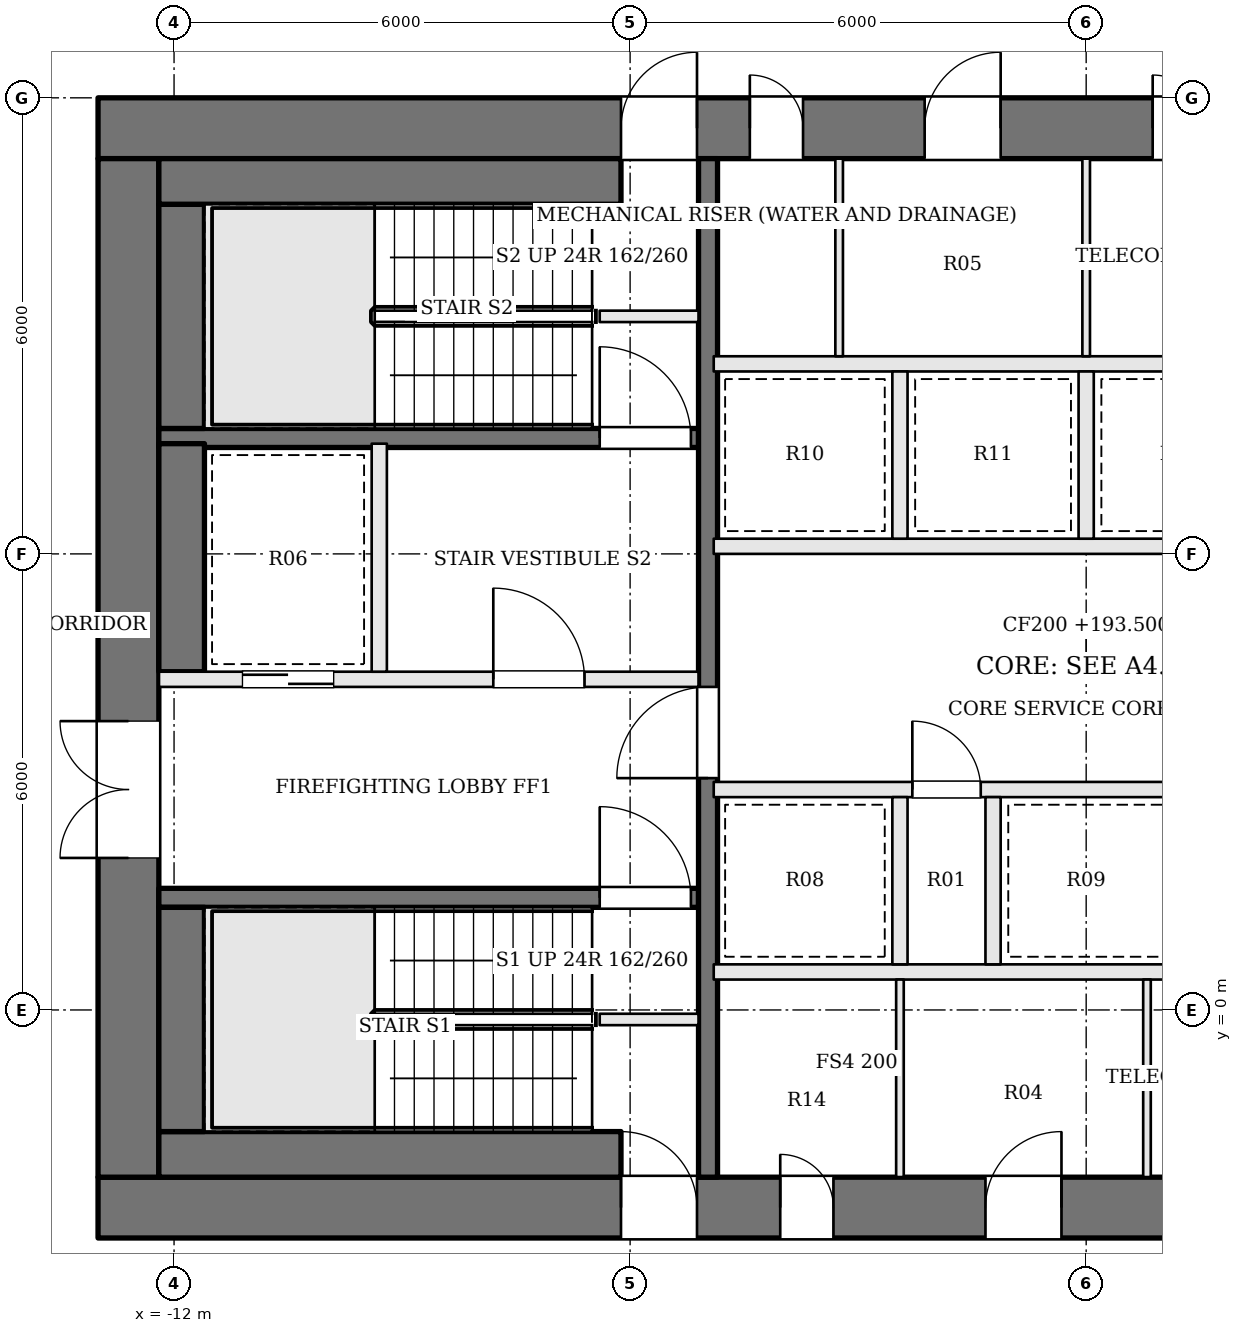
"""IFC4 building model, lengths in metres.
Left out: names, types, materials, properties, quantities, classifications, styles, units other than length and angle.
Written with IfcOpenShell. Run it as: python <this file> out.ifc"""

import sys

from ifc_helpers import new_model, si_unit, direction, frame, frame_2d, origin, place, context, subcontext, project, spatial, rectangle, extrude, element, fill, save


model = new_model("IFC4")
c1 = context("Model", 3, precision=1e-05, world=origin(), true_north=direction((0.0, 1.0)))
c2 = subcontext(c1, "Body", "Model", "MODEL_VIEW")
j1 = project(units=[si_unit("LENGTHUNIT", "METRE"), si_unit("PLANEANGLEUNIT", "RADIAN")], contexts=[c1])
p1 = place(None, origin())
s1 = spatial("IfcSite", under=j1, at=p1, CompositionType="ELEMENT")
p2 = place(p1, origin())
s2 = spatial("IfcBuilding", under=s1, at=p2, CompositionType="ELEMENT")
p3 = place(p2, frame((0.0, 0.0, 193.5)))
s3 = spatial("IfcBuildingStorey", under=s2, at=p3, CompositionType="ELEMENT", Elevation=193.5)
p4 = place(p3, frame((-13.0, 11.6, 0.0), z_axis=(0.0, 0.0, 1.0), x_axis=(1.0, 0.0, 0.0)))
e1 = element("IfcWall", 1, at=p4, inside=s3, PredefinedType="SHEAR", context=c2, shape_type="SweptSolid", body=[
    extrude(rectangle(XDim=26.0, YDim=0.8, at=frame_2d((13.0, 0.0))), origin(), (0.0, 0.0, 1.0), 3.9),
])
p5 = place(p4, frame((8.575, 0.0, 0.0)))
e2 = element("IfcOpeningElement", 2, at=p5, cuts=e1, PredefinedType="OPENING", context=c2, shape_type="SweptSolid", body=[
    extrude(rectangle(XDim=0.7, YDim=2.1, at=frame_2d((0.35, 1.05))), frame((0.0, 0.41, 0.0), z_axis=(0.0, -1.0, 0.0), x_axis=(1.0, 0.0, 0.0)), (0.0, 0.0, 1.0), 0.82),
])
p6 = place(p4, frame((10.875, 0.0, 0.0)))
e3 = element("IfcOpeningElement", 3, at=p6, cuts=e1, PredefinedType="OPENING", context=c2, shape_type="SweptSolid", body=[
    extrude(rectangle(XDim=1.0, YDim=2.1, at=frame_2d((0.5, 1.05))), frame((0.0, 0.41, 0.0), z_axis=(0.0, -1.0, 0.0), x_axis=(1.0, 0.0, 0.0)), (0.0, 0.0, 1.0), 0.82),
])
p7 = place(p4, frame((13.875, 0.0, 0.0)))
e4 = element("IfcOpeningElement", 4, at=p7, cuts=e1, PredefinedType="OPENING", context=c2, shape_type="SweptSolid", body=[
    extrude(rectangle(XDim=0.7, YDim=2.1, at=frame_2d((0.35, 1.05))), frame((0.0, 0.41, 0.0), z_axis=(0.0, -1.0, 0.0), x_axis=(1.0, 0.0, 0.0)), (0.0, 0.0, 1.0), 0.82),
])
p8 = place(p4, frame((16.325, 0.0, 0.0)))
e5 = element("IfcOpeningElement", 5, at=p8, cuts=e1, PredefinedType="OPENING", context=c2, shape_type="SweptSolid", body=[
    extrude(rectangle(XDim=0.7, YDim=2.1, at=frame_2d((0.35, 1.05))), frame((0.0, 0.41, 0.0), z_axis=(0.0, -1.0, 0.0), x_axis=(1.0, 0.0, 0.0)), (0.0, 0.0, 1.0), 0.82),
])
p9 = place(p4, frame((6.88, 0.0, 0.0)))
e6 = element("IfcOpeningElement", 6, at=p9, cuts=e1, PredefinedType="OPENING", context=c2, shape_type="SweptSolid", body=[
    extrude(rectangle(XDim=1.0, YDim=2.1, at=frame_2d((0.5, 1.05))), frame((0.0, 0.41, 0.0), z_axis=(0.0, -1.0, 0.0), x_axis=(1.0, 0.0, 0.0)), (0.0, 0.0, 1.0), 0.82),
])
p10 = place(p4, frame((18.12, 0.0, 0.0)))
e7 = element("IfcOpeningElement", 7, at=p10, cuts=e1, PredefinedType="OPENING", context=c2, shape_type="SweptSolid", body=[
    extrude(rectangle(XDim=1.0, YDim=2.1, at=frame_2d((0.5, 1.05))), frame((0.0, 0.41, 0.0), z_axis=(0.0, -1.0, 0.0), x_axis=(1.0, 0.0, 0.0)), (0.0, 0.0, 1.0), 0.82),
])
p11 = place(p3, frame((-13.0, -2.6, 0.0), z_axis=(0.0, 0.0, 1.0), x_axis=(1.0, 0.0, 0.0)))
e8 = element("IfcWall", 8, at=p11, inside=s3, PredefinedType="SHEAR", context=c2, shape_type="SweptSolid", body=[
    extrude(rectangle(XDim=26.0, YDim=0.8, at=frame_2d((13.0, 0.0))), origin(), (0.0, 0.0, 1.0), 3.9),
])
p12 = place(p11, frame((8.975, 0.0, 0.0)))
e9 = element("IfcOpeningElement", 9, at=p12, cuts=e8, PredefinedType="OPENING", context=c2, shape_type="SweptSolid", body=[
    extrude(rectangle(XDim=0.7, YDim=2.1, at=frame_2d((0.35, 1.05))), frame((0.0, 0.41, 0.0), z_axis=(0.0, -1.0, 0.0), x_axis=(1.0, 0.0, 0.0)), (0.0, 0.0, 1.0), 0.82),
])
p13 = place(p11, frame((11.675, 0.0, 0.0)))
e10 = element("IfcOpeningElement", 10, at=p13, cuts=e8, PredefinedType="OPENING", context=c2, shape_type="SweptSolid", body=[
    extrude(rectangle(XDim=1.0, YDim=2.1, at=frame_2d((0.5, 1.05))), frame((0.0, 0.41, 0.0), z_axis=(0.0, -1.0, 0.0), x_axis=(1.0, 0.0, 0.0)), (0.0, 0.0, 1.0), 0.82),
])
p14 = place(p11, frame((14.275, 0.0, 0.0)))
e11 = element("IfcOpeningElement", 11, at=p14, cuts=e8, PredefinedType="OPENING", context=c2, shape_type="SweptSolid", body=[
    extrude(rectangle(XDim=0.7, YDim=2.1, at=frame_2d((0.35, 1.05))), frame((0.0, 0.41, 0.0), z_axis=(0.0, -1.0, 0.0), x_axis=(1.0, 0.0, 0.0)), (0.0, 0.0, 1.0), 0.82),
])
p15 = place(p11, frame((16.225, 0.0, 0.0)))
e12 = element("IfcOpeningElement", 12, at=p15, cuts=e8, PredefinedType="OPENING", context=c2, shape_type="SweptSolid", body=[
    extrude(rectangle(XDim=0.9, YDim=2.1, at=frame_2d((0.45, 1.05))), frame((0.0, 0.41, 0.0), z_axis=(0.0, -1.0, 0.0), x_axis=(1.0, 0.0, 0.0)), (0.0, 0.0, 1.0), 0.82),
])
p16 = place(p11, frame((6.88, 0.0, 0.0)))
e13 = element("IfcOpeningElement", 13, at=p16, cuts=e8, PredefinedType="OPENING", context=c2, shape_type="SweptSolid", body=[
    extrude(rectangle(XDim=1.0, YDim=2.1, at=frame_2d((0.5, 1.05))), frame((0.0, 0.41, 0.0), z_axis=(0.0, -1.0, 0.0), x_axis=(1.0, 0.0, 0.0)), (0.0, 0.0, 1.0), 0.82),
])
p17 = place(p11, frame((18.12, 0.0, 0.0)))
e14 = element("IfcOpeningElement", 14, at=p17, cuts=e8, PredefinedType="OPENING", context=c2, shape_type="SweptSolid", body=[
    extrude(rectangle(XDim=1.0, YDim=2.1, at=frame_2d((0.5, 1.05))), frame((0.0, 0.41, 0.0), z_axis=(0.0, -1.0, 0.0), x_axis=(1.0, 0.0, 0.0)), (0.0, 0.0, 1.0), 0.82),
])
p18 = place(p3, frame((-12.6, -2.2, 0.0), z_axis=(0.0, 0.0, 1.0), x_axis=(0.0, 1.0, 0.0)))
e15 = element("IfcWall", 15, at=p18, inside=s3, PredefinedType="SHEAR", context=c2, shape_type="SweptSolid", body=[
    extrude(rectangle(XDim=13.4, YDim=0.8, at=frame_2d((6.7, 0.0))), origin(), (0.0, 0.0, 1.0), 3.9),
])
p19 = place(p18, frame((4.2, 0.0, 0.0)))
e16 = element("IfcOpeningElement", 16, at=p19, cuts=e15, PredefinedType="OPENING", context=c2, shape_type="SweptSolid", body=[
    extrude(rectangle(XDim=1.8, YDim=2.1, at=frame_2d((0.9, 1.05))), frame((0.0, 0.41, 0.0), z_axis=(0.0, -1.0, 0.0), x_axis=(1.0, 0.0, 0.0)), (0.0, 0.0, 1.0), 0.82),
])
for number, where, z_axis, x_axis in (
    (17, (-6.4, -0.125, 0.0), (0.0, 0.0, 1.0), (1.0, 0.0, 0.0)),
    (18, (-6.4, 9.125, 0.0), (0.0, 0.0, 1.0), (1.0, 0.0, 0.0)),
):
    element("IfcWall", number, at=place(p3, frame(where, z_axis=z_axis, x_axis=x_axis)), inside=s3, PredefinedType="SOLIDWALL", context=c2, shape_type="SweptSolid", body=[
        extrude(rectangle(XDim=1.3, YDim=0.15, at=frame_2d((0.65, 0.0))), origin(), (0.0, 0.0, 1.0), 3.7),
    ])
p20 = place(p3, frame((-12.2, 1.475, 0.0), z_axis=(0.0, 0.0, 1.0), x_axis=(1.0, 0.0, 0.0)))
e19 = element("IfcWall", 19, at=p20, inside=s3, PredefinedType="SOLIDWALL", context=c2, shape_type="SweptSolid", body=[
    extrude(rectangle(XDim=7.1, YDim=0.25, at=frame_2d((3.55, 0.0))), origin(), (0.0, 0.0, 1.0), 3.7),
])
p21 = place(p20, frame((5.8, 0.0, 0.0)))
e20 = element("IfcOpeningElement", 20, at=p21, cuts=e19, PredefinedType="OPENING", context=c2, shape_type="SweptSolid", body=[
    extrude(rectangle(XDim=1.2, YDim=2.1, at=frame_2d((0.6, 1.05))), frame((0.0, 0.135, 0.0), z_axis=(0.0, -1.0, 0.0), x_axis=(1.0, 0.0, 0.0)), (0.0, 0.0, 1.0), 0.27),
])
p22 = place(p3, frame((-12.2, 4.35, 0.0), z_axis=(0.0, 0.0, 1.0), x_axis=(1.0, 0.0, 0.0)))
e21 = element("IfcWall", 21, at=p22, inside=s3, PredefinedType="SOLIDWALL", context=c2, shape_type="SweptSolid", body=[
    extrude(rectangle(XDim=7.1, YDim=0.2, at=frame_2d((3.55, 0.0))), origin(), (0.0, 0.0, 1.0), 3.7),
])
p23 = place(p22, frame((4.4, 0.0, 0.0)))
e22 = element("IfcOpeningElement", 22, at=p23, cuts=e21, PredefinedType="OPENING", context=c2, shape_type="SweptSolid", body=[
    extrude(rectangle(XDim=1.2, YDim=2.1, at=frame_2d((0.6, 1.05))), frame((0.0, 0.11, 0.0), z_axis=(0.0, -1.0, 0.0), x_axis=(1.0, 0.0, 0.0)), (0.0, 0.0, 1.0), 0.22),
])
p24 = place(p22, frame((1.1, 0.0, 0.0)))
e23 = element("IfcOpeningElement", 23, at=p24, cuts=e21, PredefinedType="OPENING", context=c2, shape_type="SweptSolid", body=[
    extrude(rectangle(XDim=1.2, YDim=2.1, at=frame_2d((0.6, 1.05))), frame((0.0, 0.11, 0.0), z_axis=(0.0, -1.0, 0.0), x_axis=(1.0, 0.0, 0.0)), (0.0, 0.0, 1.0), 0.22),
])
p25 = place(p3, frame((-12.2, 7.525, 0.0), z_axis=(0.0, 0.0, 1.0), x_axis=(1.0, 0.0, 0.0)))
e24 = element("IfcWall", 24, at=p25, inside=s3, PredefinedType="SOLIDWALL", context=c2, shape_type="SweptSolid", body=[
    extrude(rectangle(XDim=7.1, YDim=0.25, at=frame_2d((3.55, 0.0))), origin(), (0.0, 0.0, 1.0), 3.7),
])
p26 = place(p25, frame((5.8, 0.0, 0.0)))
e25 = element("IfcOpeningElement", 25, at=p26, cuts=e24, PredefinedType="OPENING", context=c2, shape_type="SweptSolid", body=[
    extrude(rectangle(XDim=1.2, YDim=2.1, at=frame_2d((0.6, 1.05))), frame((0.0, 0.135, 0.0), z_axis=(0.0, -1.0, 0.0), x_axis=(1.0, 0.0, 0.0)), (0.0, 0.0, 1.0), 0.27),
])
p27 = place(p3, frame((-9.3, 4.45, 0.0), z_axis=(0.0, 0.0, 1.0), x_axis=(0.0, 1.0, 0.0)))
e26 = element("IfcWall", 26, at=p27, inside=s3, PredefinedType="SOLIDWALL", context=c2, shape_type="SweptSolid", body=[
    extrude(rectangle(XDim=3.0, YDim=0.2, at=frame_2d((1.5, 0.0))), origin(), (0.0, 0.0, 1.0), 3.7),
])
p28 = place(p3, frame((-4.975, -2.2, 0.0), z_axis=(0.0, 0.0, 1.0), x_axis=(0.0, 1.0, 0.0)))
e27 = element("IfcWall", 27, at=p28, inside=s3, PredefinedType="SOLIDWALL", context=c2, shape_type="SweptSolid", body=[
    extrude(rectangle(XDim=13.4, YDim=0.25, at=frame_2d((6.7, 0.0))), origin(), (0.0, 0.0, 1.0), 3.7),
])
p29 = place(p28, frame((5.25, 0.0, 0.0)))
e28 = element("IfcOpeningElement", 28, at=p29, cuts=e27, PredefinedType="OPENING", context=c2, shape_type="SweptSolid", body=[
    extrude(rectangle(XDim=1.2, YDim=2.1, at=frame_2d((0.6, 1.05))), frame((0.0, 0.135, 0.0), z_axis=(0.0, -1.0, 0.0), x_axis=(1.0, 0.0, 0.0)), (0.0, 0.0, 1.0), 0.27),
])
p30 = place(p3, frame((-12.2, -1.9, 0.0), z_axis=(0.0, 0.0, 1.0), x_axis=(1.0, 0.0, 0.0)))
e29 = element("IfcWall", 29, at=p30, inside=s3, PredefinedType="SOLIDWALL", context=c2, shape_type="SweptSolid", body=[
    extrude(rectangle(XDim=6.08, YDim=0.6, at=frame_2d((3.04, 0.0))), origin(), (0.0, 0.0, 1.0), 3.7),
])
p31 = place(p3, frame((-11.9, -1.6, 0.0), z_axis=(0.0, 0.0, 1.0), x_axis=(0.0, 1.0, 0.0)))
e30 = element("IfcWall", 30, at=p31, inside=s3, PredefinedType="SOLIDWALL", context=c2, shape_type="SweptSolid", body=[
    extrude(rectangle(XDim=2.95, YDim=0.6, at=frame_2d((1.475, 0.0))), origin(), (0.0, 0.0, 1.0), 3.7),
])
p32 = place(p3, frame((-11.9, 4.45, 0.0), z_axis=(0.0, 0.0, 1.0), x_axis=(0.0, 1.0, 0.0)))
e31 = element("IfcWall", 31, at=p32, inside=s3, PredefinedType="SOLIDWALL", context=c2, shape_type="SweptSolid", body=[
    extrude(rectangle(XDim=3.0, YDim=0.6, at=frame_2d((1.5, 0.0))), origin(), (0.0, 0.0, 1.0), 3.7),
])
p33 = place(p3, frame((-11.9, 7.65, 0.0), z_axis=(0.0, 0.0, 1.0), x_axis=(0.0, 1.0, 0.0)))
e32 = element("IfcWall", 32, at=p33, inside=s3, PredefinedType="SOLIDWALL", context=c2, shape_type="SweptSolid", body=[
    extrude(rectangle(XDim=2.95, YDim=0.6, at=frame_2d((1.475, 0.0))), origin(), (0.0, 0.0, 1.0), 3.7),
])
p34 = place(p3, frame((-12.2, 10.9, 0.0), z_axis=(0.0, 0.0, 1.0), x_axis=(1.0, 0.0, 0.0)))
e33 = element("IfcWall", 33, at=p34, inside=s3, PredefinedType="SOLIDWALL", context=c2, shape_type="SweptSolid", body=[
    extrude(rectangle(XDim=6.08, YDim=0.6, at=frame_2d((3.04, 0.0))), origin(), (0.0, 0.0, 1.0), 3.7),
])
p35 = place(p3, frame((-4.9, 0.5, 0.0), z_axis=(0.0, 0.0, 1.0), x_axis=(1.0, 0.0, 0.0)))
e34 = element("IfcWall", 34, at=p35, inside=s3, PredefinedType="SOLIDWALL", context=c2, shape_type="SweptSolid", body=[
    extrude(rectangle(XDim=9.8, YDim=0.2, at=frame_2d((4.9, 0.0))), origin(), (0.0, 0.0, 1.0), 3.7),
])
p36 = place(p3, frame((-4.9, 2.9, 0.0), z_axis=(0.0, 0.0, 1.0), x_axis=(1.0, 0.0, 0.0)))
e35 = element("IfcWall", 35, at=p36, inside=s3, PredefinedType="SOLIDWALL", context=c2, shape_type="SweptSolid", body=[
    extrude(rectangle(XDim=9.8, YDim=0.2, at=frame_2d((4.9, 0.0))), origin(), (0.0, 0.0, 1.0), 3.7),
])
p37 = place(p36, frame((2.613, 0.0, 0.0)))
e36 = element("IfcOpeningElement", 36, at=p37, cuts=e35, PredefinedType="OPENING", context=c2, shape_type="SweptSolid", body=[
    extrude(rectangle(XDim=0.9, YDim=2.1, at=frame_2d((0.45, 1.05))), frame((0.0, 0.11, 0.0), z_axis=(0.0, -1.0, 0.0), x_axis=(1.0, 0.0, 0.0)), (0.0, 0.0, 1.0), 0.22),
])
p38 = place(p36, frame((7.463, 0.0, 0.0)))
e37 = element("IfcOpeningElement", 37, at=p38, cuts=e35, PredefinedType="OPENING", context=c2, shape_type="SweptSolid", body=[
    extrude(rectangle(XDim=1.0, YDim=2.1, at=frame_2d((0.5, 1.05))), frame((0.0, 0.11, 0.0), z_axis=(0.0, -1.0, 0.0), x_axis=(1.0, 0.0, 0.0)), (0.0, 0.0, 1.0), 0.22),
])
for number, where, z_axis, x_axis in (
    (38, (-4.9, 6.1, 0.0), (0.0, 0.0, 1.0), (1.0, 0.0, 0.0)),
    (39, (-4.9, 8.5, 0.0), (0.0, 0.0, 1.0), (1.0, 0.0, 0.0)),
):
    element("IfcWall", number, at=place(p3, frame(where, z_axis=z_axis, x_axis=x_axis)), inside=s3, PredefinedType="SOLIDWALL", context=c2, shape_type="SweptSolid", body=[
        extrude(rectangle(XDim=9.8, YDim=0.2, at=frame_2d((4.9, 0.0))), origin(), (0.0, 0.0, 1.0), 3.7),
    ])
for number, where, z_axis, x_axis in (
    (40, (-2.45, 0.6, 0.0), (0.0, 0.0, 1.0), (0.0, 1.0, 0.0)),
    (41, (-1.225, 0.6, 0.0), (0.0, 0.0, 1.0), (0.0, 1.0, 0.0)),
    (42, (-2.45, 6.2, 0.0), (0.0, 0.0, 1.0), (0.0, 1.0, 0.0)),
    (43, (0.0, 6.2, 0.0), (0.0, 0.0, 1.0), (0.0, 1.0, 0.0)),
):
    element("IfcWall", number, at=place(p3, frame(where, z_axis=z_axis, x_axis=x_axis)), inside=s3, PredefinedType="SOLIDWALL", context=c2, shape_type="SweptSolid", body=[
        extrude(rectangle(XDim=2.2, YDim=0.2, at=frame_2d((1.1, 0.0))), origin(), (0.0, 0.0, 1.0), 3.7),
    ])
for number, where, z_axis, x_axis in (
    (44, (-2.45, -2.2, 0.0), (0.0, 0.0, 1.0), (0.0, 1.0, 0.0)),
    (45, (0.8, -2.2, 0.0), (0.0, 0.0, 1.0), (0.0, 1.0, 0.0)),
    (46, (-3.25, 8.6, 0.0), (0.0, 0.0, 1.0), (0.0, 1.0, 0.0)),
    (47, (0.0, 8.6, 0.0), (0.0, 0.0, 1.0), (0.0, 1.0, 0.0)),
):
    element("IfcWall", number, at=place(p3, frame(where, z_axis=z_axis, x_axis=x_axis)), inside=s3, PredefinedType="PARTITIONING", context=c2, shape_type="SweptSolid", body=[
        extrude(rectangle(XDim=2.6, YDim=0.1, at=frame_2d((1.3, 0.0))), origin(), (0.0, 0.0, 1.0), 3.7),
    ])
p39 = place(p19, origin())
e48 = element("IfcDoor", 48, at=p39, inside=s3, OperationType="DOUBLE_DOOR_SINGLE_SWING", PredefinedType="DOOR", context=c2, shape_type="SweptSolid", body=[
    extrude(rectangle(XDim=1.8, YDim=2.1, at=frame_2d((0.9, 1.05))), frame((0.0, 0.025, 0.0), z_axis=(0.0, -1.0, 0.0), x_axis=(1.0, 0.0, 0.0)), (0.0, 0.0, 1.0), 0.05),
])
fill(e16, e48)
p40 = place(p29, origin())
e49 = element("IfcDoor", 49, at=p40, inside=s3, OperationType="SINGLE_SWING_LEFT", PredefinedType="DOOR", context=c2, shape_type="SweptSolid", body=[
    extrude(rectangle(XDim=1.2, YDim=2.1, at=frame_2d((0.6, 1.05))), frame((0.0, 0.025, 0.0), z_axis=(0.0, -1.0, 0.0), x_axis=(1.0, 0.0, 0.0)), (0.0, 0.0, 1.0), 0.05),
])
fill(e28, e49)
p41 = place(p23, origin())
e50 = element("IfcDoor", 50, at=p41, inside=s3, OperationType="SINGLE_SWING_LEFT", PredefinedType="DOOR", context=c2, shape_type="SweptSolid", body=[
    extrude(rectangle(XDim=1.2, YDim=2.1, at=frame_2d((0.6, 1.05))), frame((0.0, 0.025, 0.0), z_axis=(0.0, -1.0, 0.0), x_axis=(1.0, 0.0, 0.0)), (0.0, 0.0, 1.0), 0.05),
])
fill(e22, e50)
p42 = place(p21, origin())
e51 = element("IfcDoor", 51, at=p42, inside=s3, OperationType="SINGLE_SWING_LEFT", PredefinedType="DOOR", context=c2, shape_type="SweptSolid", body=[
    extrude(rectangle(XDim=1.2, YDim=2.1, at=frame_2d((0.6, 1.05))), frame((0.0, 0.025, 0.0), z_axis=(0.0, -1.0, 0.0), x_axis=(1.0, 0.0, 0.0)), (0.0, 0.0, 1.0), 0.05),
])
fill(e20, e51)
p43 = place(p26, origin())
e52 = element("IfcDoor", 52, at=p43, inside=s3, OperationType="SINGLE_SWING_LEFT", PredefinedType="DOOR", context=c2, shape_type="SweptSolid", body=[
    extrude(rectangle(XDim=1.2, YDim=2.1, at=frame_2d((0.6, 1.05))), frame((0.0, 0.025, 0.0), z_axis=(0.0, -1.0, 0.0), x_axis=(1.0, 0.0, 0.0)), (0.0, 0.0, 1.0), 0.05),
])
fill(e25, e52)
p44 = place(p24, origin())
e53 = element("IfcDoor", 53, at=p44, inside=s3, OperationType="SLIDING_TO_RIGHT", PredefinedType="DOOR", context=c2, shape_type="SweptSolid", body=[
    extrude(rectangle(XDim=1.2, YDim=2.1, at=frame_2d((0.6, 1.05))), frame((0.0, 0.025, 0.0), z_axis=(0.0, -1.0, 0.0), x_axis=(1.0, 0.0, 0.0)), (0.0, 0.0, 1.0), 0.05),
])
fill(e23, e53)
p45 = place(p37, origin())
e54 = element("IfcDoor", 54, at=p45, inside=s3, OperationType="SINGLE_SWING_LEFT", PredefinedType="DOOR", context=c2, shape_type="SweptSolid", body=[
    extrude(rectangle(XDim=0.9, YDim=2.1, at=frame_2d((0.45, 1.05))), frame((0.0, 0.025, 0.0), z_axis=(0.0, -1.0, 0.0), x_axis=(1.0, 0.0, 0.0)), (0.0, 0.0, 1.0), 0.05),
])
fill(e36, e54)
p46 = place(p12, origin())
e55 = element("IfcDoor", 55, at=p46, inside=s3, OperationType="SINGLE_SWING_LEFT", PredefinedType="DOOR", context=c2, shape_type="SweptSolid", body=[
    extrude(rectangle(XDim=0.7, YDim=2.1, at=frame_2d((0.35, 1.05))), frame((0.0, 0.025, 0.0), z_axis=(0.0, -1.0, 0.0), x_axis=(1.0, 0.0, 0.0)), (0.0, 0.0, 1.0), 0.05),
])
fill(e9, e55)
p47 = place(p13, origin())
e56 = element("IfcDoor", 56, at=p47, inside=s3, OperationType="SINGLE_SWING_RIGHT", PredefinedType="DOOR", context=c2, shape_type="SweptSolid", body=[
    extrude(rectangle(XDim=1.0, YDim=2.1, at=frame_2d((0.5, 1.05))), frame((0.0, 0.025, 0.0), z_axis=(0.0, -1.0, 0.0), x_axis=(1.0, 0.0, 0.0)), (0.0, 0.0, 1.0), 0.05),
])
fill(e10, e56)
p48 = place(p5, origin())
e57 = element("IfcDoor", 57, at=p48, inside=s3, OperationType="SINGLE_SWING_LEFT", PredefinedType="DOOR", context=c2, shape_type="SweptSolid", body=[
    extrude(rectangle(XDim=0.7, YDim=2.1, at=frame_2d((0.35, 1.05))), frame((0.0, 0.025, 0.0), z_axis=(0.0, -1.0, 0.0), x_axis=(1.0, 0.0, 0.0)), (0.0, 0.0, 1.0), 0.05),
])
fill(e2, e57)
p49 = place(p6, origin())
e58 = element("IfcDoor", 58, at=p49, inside=s3, OperationType="SINGLE_SWING_RIGHT", PredefinedType="DOOR", context=c2, shape_type="SweptSolid", body=[
    extrude(rectangle(XDim=1.0, YDim=2.1, at=frame_2d((0.5, 1.05))), frame((0.0, 0.025, 0.0), z_axis=(0.0, -1.0, 0.0), x_axis=(1.0, 0.0, 0.0)), (0.0, 0.0, 1.0), 0.05),
])
fill(e3, e58)
p50 = place(p7, origin())
e59 = element("IfcDoor", 59, at=p50, inside=s3, OperationType="SINGLE_SWING_LEFT", PredefinedType="DOOR", context=c2, shape_type="SweptSolid", body=[
    extrude(rectangle(XDim=0.7, YDim=2.1, at=frame_2d((0.35, 1.05))), frame((0.0, 0.025, 0.0), z_axis=(0.0, -1.0, 0.0), x_axis=(1.0, 0.0, 0.0)), (0.0, 0.0, 1.0), 0.05),
])
fill(e4, e59)
p51 = place(p16, origin())
e60 = element("IfcDoor", 60, at=p51, inside=s3, OperationType="SINGLE_SWING_LEFT", PredefinedType="DOOR", context=c2, shape_type="SweptSolid", body=[
    extrude(rectangle(XDim=1.0, YDim=2.1, at=frame_2d((0.5, 1.05))), frame((0.0, 0.025, 0.0), z_axis=(0.0, -1.0, 0.0), x_axis=(1.0, 0.0, 0.0)), (0.0, 0.0, 1.0), 0.05),
])
fill(e13, e60)
p52 = place(p9, origin())
e61 = element("IfcDoor", 61, at=p52, inside=s3, OperationType="SINGLE_SWING_RIGHT", PredefinedType="DOOR", context=c2, shape_type="SweptSolid", body=[
    extrude(rectangle(XDim=1.0, YDim=2.1, at=frame_2d((0.5, 1.05))), frame((0.0, 0.025, 0.0), z_axis=(0.0, -1.0, 0.0), x_axis=(1.0, 0.0, 0.0)), (0.0, 0.0, 1.0), 0.05),
])
fill(e6, e61)
save(model, sys.argv[1])
